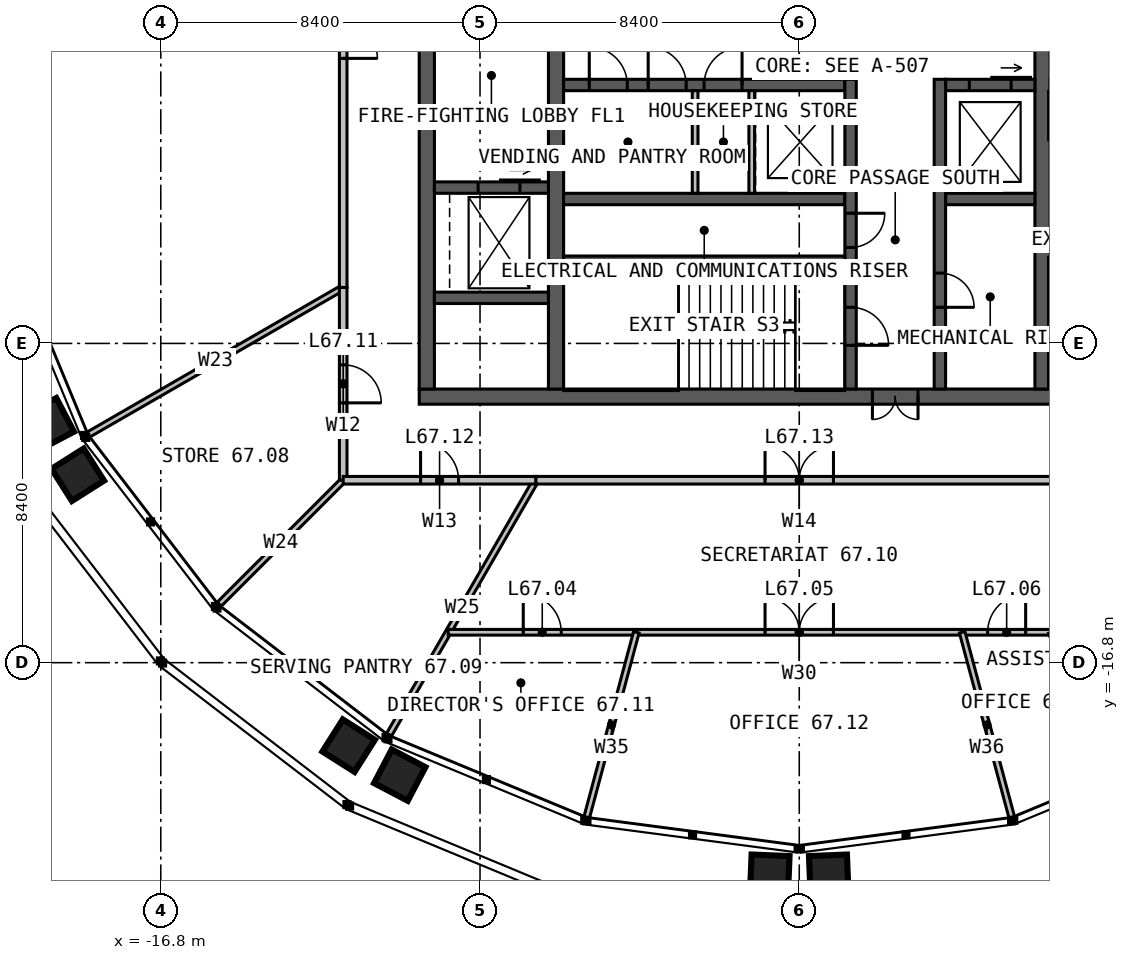
"""IFC4 building model, lengths in metres.
Left out: names, types, materials, properties, quantities, classifications, styles, units other than length and angle.
Written with IfcOpenShell. Run it as: python <this file> out.ifc"""

import sys

from ifc_helpers import new_model, si_unit, direction, frame, frame_2d, origin, place, context, subcontext, project, spatial, rectangle, extrude, element, fill, save


model = new_model("IFC4")
c1 = context("Model", 3, precision=1e-05, world=origin(), true_north=direction((0.0, 1.0)))
c2 = subcontext(c1, "Body", "Model", "MODEL_VIEW")
j1 = project(units=[si_unit("LENGTHUNIT", "METRE"), si_unit("PLANEANGLEUNIT", "RADIAN")], contexts=[c1])
p1 = place(None, origin())
s1 = spatial("IfcSite", under=j1, at=p1, CompositionType="ELEMENT")
p2 = place(p1, origin())
s2 = spatial("IfcBuilding", under=s1, at=p2, CompositionType="ELEMENT")
p3 = place(p2, frame((0.0, 0.0, 276.0)))
s3 = spatial("IfcBuildingStorey", under=s2, at=p3, CompositionType="ELEMENT", Elevation=276.0)
p4 = place(p3, frame((10.0, -9.8, 0.0), z_axis=(0.0, 0.0, 1.0), x_axis=(-1.0, 0.0, 0.0)))
e1 = element("IfcWall", 1, at=p4, inside=s3, PredefinedType="SOLIDWALL", context=c2, shape_type="SweptSolid", body=[
    extrude(rectangle(XDim=20.0, YDim=0.4, at=frame_2d((10.0, 0.0))), origin(), (0.0, 0.0, 1.0), 4.0),
])
p5 = place(p4, frame((6.875, 0.0, 0.0)))
e2 = element("IfcOpeningElement", 2, at=p5, cuts=e1, PredefinedType="OPENING", context=c2, shape_type="SweptSolid", body=[
    extrude(rectangle(XDim=1.2, YDim=2.2, at=frame_2d((0.6, 1.1))), frame((0.0, 0.21, 0.0), z_axis=(0.0, -1.0, 0.0), x_axis=(1.0, 0.0, 0.0)), (0.0, 0.0, 1.0), 0.42),
])
p6 = place(p3, frame((-9.8, 9.6, 0.0), z_axis=(0.0, 0.0, 1.0), x_axis=(0.0, -1.0, 0.0)))
e3 = element("IfcWall", 3, at=p6, inside=s3, PredefinedType="SOLIDWALL", context=c2, shape_type="SweptSolid", body=[
    extrude(rectangle(XDim=19.2, YDim=0.4, at=frame_2d((9.6, 0.0))), origin(), (0.0, 0.0, 1.0), 4.0),
])
p7 = place(p3, frame((-6.4, -9.6, 0.0), z_axis=(0.0, 0.0, 1.0), x_axis=(0.0, 1.0, 0.0)))
e4 = element("IfcWall", 4, at=p7, inside=s3, PredefinedType="SOLIDWALL", context=c2, shape_type="SweptSolid", body=[
    extrude(rectangle(XDim=19.2, YDim=0.4, at=frame_2d((9.6, 0.0))), origin(), (0.0, 0.0, 1.0), 4.0),
])
p8 = place(p7, frame((9.1, 0.0, 0.0)))
e5 = element("IfcOpeningElement", 5, at=p8, cuts=e4, PredefinedType="OPENING", context=c2, shape_type="SweptSolid", body=[
    extrude(rectangle(XDim=1.0, YDim=2.2, at=frame_2d((0.5, 1.1))), frame((0.0, 0.21, 0.0), z_axis=(0.0, -1.0, 0.0), x_axis=(1.0, 0.0, 0.0)), (0.0, 0.0, 1.0), 0.42),
])
p9 = place(p3, frame((6.4, 9.6, 0.0), z_axis=(0.0, 0.0, 1.0), x_axis=(0.0, -1.0, 0.0)))
e6 = element("IfcWall", 6, at=p9, inside=s3, PredefinedType="SOLIDWALL", context=c2, shape_type="SweptSolid", body=[
    extrude(rectangle(XDim=19.2, YDim=0.4, at=frame_2d((9.6, 0.0))), origin(), (0.0, 0.0, 1.0), 4.0),
])
p10 = place(p9, frame((9.1, 0.0, 0.0)))
e7 = element("IfcOpeningElement", 7, at=p10, cuts=e6, PredefinedType="OPENING", context=c2, shape_type="SweptSolid", body=[
    extrude(rectangle(XDim=1.0, YDim=2.2, at=frame_2d((0.5, 1.1))), frame((0.0, 0.21, 0.0), z_axis=(0.0, -1.0, 0.0), x_axis=(1.0, 0.0, 0.0)), (0.0, 0.0, 1.0), 0.42),
])
p11 = place(p3, frame((-6.2, -1.6, 0.0), z_axis=(0.0, 0.0, 1.0), x_axis=(1.0, 0.0, 0.0)))
e8 = element("IfcWall", 8, at=p11, inside=s3, PredefinedType="SOLIDWALL", context=c2, shape_type="SweptSolid", body=[
    extrude(rectangle(XDim=7.4, YDim=0.3, at=frame_2d((3.7, 0.0))), origin(), (0.0, 0.0, 1.0), 4.0),
])
p12 = place(p11, frame((0.675, 0.0, 0.0)))
e9 = element("IfcOpeningElement", 9, at=p12, cuts=e8, PredefinedType="OPENING", context=c2, shape_type="SweptSolid", body=[
    extrude(rectangle(XDim=1.0, YDim=2.2, at=frame_2d((0.5, 1.1))), frame((0.0, 0.16, 0.0), z_axis=(0.0, -1.0, 0.0), x_axis=(1.0, 0.0, 0.0)), (0.0, 0.0, 1.0), 0.32),
])
p13 = place(p11, frame((2.225, 0.0, 0.0)))
e10 = element("IfcOpeningElement", 10, at=p13, cuts=e8, PredefinedType="OPENING", context=c2, shape_type="SweptSolid", body=[
    extrude(rectangle(XDim=1.0, YDim=2.2, at=frame_2d((0.5, 1.1))), frame((0.0, 0.16, 0.0), z_axis=(0.0, -1.0, 0.0), x_axis=(1.0, 0.0, 0.0)), (0.0, 0.0, 1.0), 0.32),
])
p14 = place(p11, frame((3.695, 0.0, 0.0)))
e11 = element("IfcOpeningElement", 11, at=p14, cuts=e8, PredefinedType="OPENING", context=c2, shape_type="SweptSolid", body=[
    extrude(rectangle(XDim=1.0, YDim=2.2, at=frame_2d((0.5, 1.1))), frame((0.0, 0.16, 0.0), z_axis=(0.0, -1.0, 0.0), x_axis=(1.0, 0.0, 0.0)), (0.0, 0.0, 1.0), 0.32),
])
p15 = place(p3, frame((3.85, -1.6, 0.0), z_axis=(0.0, 0.0, 1.0), x_axis=(1.0, 0.0, 0.0)))
e12 = element("IfcWall", 12, at=p15, inside=s3, PredefinedType="SOLIDWALL", context=c2, shape_type="SweptSolid", body=[
    extrude(rectangle(XDim=2.35, YDim=0.3, at=frame_2d((1.175, 0.0))), origin(), (0.0, 0.0, 1.0), 4.0),
])
p16 = place(p15, frame((0.625, 0.0, 0.0)))
e13 = element("IfcOpeningElement", 13, at=p16, cuts=e12, PredefinedType="OPENING", context=c2, shape_type="SweptSolid", body=[
    extrude(rectangle(XDim=1.1, YDim=2.2, at=frame_2d((0.55, 1.1))), frame((0.0, 0.16, 0.0), z_axis=(0.0, -1.0, 0.0), x_axis=(1.0, 0.0, 0.0)), (0.0, 0.0, 1.0), 0.32),
])
p17 = place(p3, frame((-6.2, -4.6, 0.0), z_axis=(0.0, 0.0, 1.0), x_axis=(1.0, 0.0, 0.0)))
e14 = element("IfcWall", 14, at=p17, inside=s3, PredefinedType="SOLIDWALL", context=c2, shape_type="SweptSolid", body=[
    extrude(rectangle(XDim=7.4, YDim=0.3, at=frame_2d((3.7, 0.0))), origin(), (0.0, 0.0, 1.0), 4.0),
])
p18 = place(p3, frame((3.85, -4.6, 0.0), z_axis=(0.0, 0.0, 1.0), x_axis=(1.0, 0.0, 0.0)))
e15 = element("IfcWall", 15, at=p18, inside=s3, PredefinedType="SOLIDWALL", context=c2, shape_type="SweptSolid", body=[
    extrude(rectangle(XDim=2.35, YDim=0.3, at=frame_2d((1.175, 0.0))), origin(), (0.0, 0.0, 1.0), 4.0),
])
p19 = place(p3, frame((1.35, -1.45, 0.0), z_axis=(0.0, 0.0, 1.0), x_axis=(0.0, -1.0, 0.0)))
e16 = element("IfcWall", 16, at=p19, inside=s3, PredefinedType="SOLIDWALL", context=c2, shape_type="SweptSolid", body=[
    extrude(rectangle(XDim=8.15, YDim=0.3, at=frame_2d((4.075, 0.0))), origin(), (0.0, 0.0, 1.0), 4.0),
])
p20 = place(p19, frame((6.0, 0.0, 0.0)))
e17 = element("IfcOpeningElement", 17, at=p20, cuts=e16, PredefinedType="OPENING", context=c2, shape_type="SweptSolid", body=[
    extrude(rectangle(XDim=1.0, YDim=2.2, at=frame_2d((0.5, 1.1))), frame((0.0, 0.16, 0.0), z_axis=(0.0, -1.0, 0.0), x_axis=(1.0, 0.0, 0.0)), (0.0, 0.0, 1.0), 0.32),
])
p21 = place(p19, frame((3.525, 0.0, 0.0)))
e18 = element("IfcOpeningElement", 18, at=p21, cuts=e16, PredefinedType="OPENING", context=c2, shape_type="SweptSolid", body=[
    extrude(rectangle(XDim=0.9, YDim=2.2, at=frame_2d((0.45, 1.1))), frame((0.0, 0.16, 0.0), z_axis=(0.0, -1.0, 0.0), x_axis=(1.0, 0.0, 0.0)), (0.0, 0.0, 1.0), 0.32),
])
p22 = place(p3, frame((3.7, -1.45, 0.0), z_axis=(0.0, 0.0, 1.0), x_axis=(0.0, -1.0, 0.0)))
e19 = element("IfcWall", 19, at=p22, inside=s3, PredefinedType="SOLIDWALL", context=c2, shape_type="SweptSolid", body=[
    extrude(rectangle(XDim=8.15, YDim=0.3, at=frame_2d((4.075, 0.0))), origin(), (0.0, 0.0, 1.0), 4.0),
])
p23 = place(p22, frame((5.1, 0.0, 0.0)))
e20 = element("IfcOpeningElement", 20, at=p23, cuts=e19, PredefinedType="OPENING", context=c2, shape_type="SweptSolid", body=[
    extrude(rectangle(XDim=0.9, YDim=2.2, at=frame_2d((0.45, 1.1))), frame((0.0, 0.16, 0.0), z_axis=(0.0, -1.0, 0.0), x_axis=(1.0, 0.0, 0.0)), (0.0, 0.0, 1.0), 0.32),
])
p24 = place(p3, frame((-6.2, -6.2, 0.0), z_axis=(0.0, 0.0, 1.0), x_axis=(1.0, 0.0, 0.0)))
e21 = element("IfcWall", 21, at=p24, inside=s3, PredefinedType="SOLIDWALL", context=c2, shape_type="SweptSolid", body=[
    extrude(rectangle(XDim=7.4, YDim=0.2, at=frame_2d((3.7, 0.0))), origin(), (0.0, 0.0, 1.0), 4.0),
])
p25 = place(p3, frame((-9.6, -4.3, 0.0), z_axis=(0.0, 0.0, 1.0), x_axis=(1.0, 0.0, 0.0)))
e22 = element("IfcWall", 22, at=p25, inside=s3, PredefinedType="SOLIDWALL", context=c2, shape_type="SweptSolid", body=[
    extrude(rectangle(XDim=3.0, YDim=0.3, at=frame_2d((1.5, 0.0))), origin(), (0.0, 0.0, 1.0), 4.0),
])
p26 = place(p25, frame((1.15, 0.0, 0.0)))
e23 = element("IfcOpeningElement", 23, at=p26, cuts=e22, PredefinedType="OPENING", context=c2, shape_type="SweptSolid", body=[
    extrude(rectangle(XDim=1.1, YDim=2.2, at=frame_2d((0.55, 1.1))), frame((0.0, 0.16, 0.0), z_axis=(0.0, -1.0, 0.0), x_axis=(1.0, 0.0, 0.0)), (0.0, 0.0, 1.0), 0.32),
])
p27 = place(p3, frame((-9.6, -7.2, 0.0), z_axis=(0.0, 0.0, 1.0), x_axis=(1.0, 0.0, 0.0)))
e24 = element("IfcWall", 24, at=p27, inside=s3, PredefinedType="SOLIDWALL", context=c2, shape_type="SweptSolid", body=[
    extrude(rectangle(XDim=3.0, YDim=0.3, at=frame_2d((1.5, 0.0))), origin(), (0.0, 0.0, 1.0), 4.0),
])
for number, where, z_axis, x_axis in (
    (25, (-2.74, -1.75, 0.0), (0.0, 0.0, 1.0), (0.0, -1.0, 0.0)),
    (26, (-1.25, -1.75, 0.0), (0.0, 0.0, 1.0), (0.0, -1.0, 0.0)),
):
    element("IfcWall", number, at=place(p3, frame(where, z_axis=z_axis, x_axis=x_axis)), inside=s3, PredefinedType="PARTITIONING", context=c2, shape_type="SweptSolid", body=[
        extrude(rectangle(XDim=2.7, YDim=0.15, at=frame_2d((1.35, 0.0))), origin(), (0.0, 0.0, 1.0), 3.75),
    ])
p28 = place(p3, frame((-12.0, -6.928, 0.0), z_axis=(0.0, 0.0, 1.0), x_axis=(-0.866025099701, -0.500000526688, 0.0)))
e27 = element("IfcWall", 27, at=p28, inside=s3, PredefinedType="PARTITIONING", context=c2, shape_type="SweptSolid", body=[
    extrude(rectangle(XDim=7.752, YDim=0.15, at=frame_2d((3.876, 0.0))), origin(), (0.0, 0.0, 1.0), 2.79),
])
p29 = place(p3, frame((-12.0, -12.0, 0.0), z_axis=(0.0, 0.0, 1.0), x_axis=(-0.707106781187, -0.707106781187, 0.0)))
e28 = element("IfcWall", 28, at=p29, inside=s3, PredefinedType="PARTITIONING", context=c2, shape_type="SweptSolid", body=[
    extrude(rectangle(XDim=4.638, YDim=0.15, at=frame_2d((2.319, 0.0))), origin(), (0.0, 0.0, 1.0), 2.79),
])
p30 = place(p3, frame((-6.928, -12.0, 0.0), z_axis=(0.0, 0.0, 1.0), x_axis=(-0.500000526688, -0.866025099701, 0.0)))
e29 = element("IfcWall", 29, at=p30, inside=s3, PredefinedType="PARTITIONING", context=c2, shape_type="SweptSolid", body=[
    extrude(rectangle(XDim=7.752, YDim=0.15, at=frame_2d((3.876, 0.0))), origin(), (0.0, 0.0, 1.0), 2.79),
])
p31 = place(p3, frame((-12.0, 6.928, 0.0), z_axis=(0.0, 0.0, 1.0), x_axis=(0.0, -1.0, 0.0)))
e30 = element("IfcWall", 30, at=p31, inside=s3, PredefinedType="PARTITIONING", context=c2, shape_type="SweptSolid", body=[
    extrude(rectangle(XDim=13.856, YDim=0.2, at=frame_2d((6.928, 0.0))), origin(), (0.0, 0.0, 1.0), 3.8),
])
p32 = place(p31, frame((6.028, 0.0, 0.0)))
e31 = element("IfcOpeningElement", 31, at=p32, cuts=e30, PredefinedType="OPENING", context=c2, shape_type="SweptSolid", body=[
    extrude(rectangle(XDim=1.8, YDim=2.2, at=frame_2d((0.9, 1.1))), frame((0.0, 0.11, 0.0), z_axis=(0.0, -1.0, 0.0), x_axis=(1.0, 0.0, 0.0)), (0.0, 0.0, 1.0), 0.22),
])
p33 = place(p3, frame((-12.0, -6.928, 0.0), z_axis=(0.0, 0.0, 1.0), x_axis=(0.0, -1.0, 0.0)))
e32 = element("IfcWall", 32, at=p33, inside=s3, PredefinedType="PARTITIONING", context=c2, shape_type="SweptSolid", body=[
    extrude(rectangle(XDim=5.072, YDim=0.2, at=frame_2d((2.536, 0.0))), origin(), (0.0, 0.0, 1.0), 3.8),
])
p34 = place(p33, frame((2.036, 0.0, 0.0)))
e33 = element("IfcOpeningElement", 33, at=p34, cuts=e32, PredefinedType="OPENING", context=c2, shape_type="SweptSolid", body=[
    extrude(rectangle(XDim=1.0, YDim=2.2, at=frame_2d((0.5, 1.1))), frame((0.0, 0.11, 0.0), z_axis=(0.0, -1.0, 0.0), x_axis=(1.0, 0.0, 0.0)), (0.0, 0.0, 1.0), 0.22),
])
p35 = place(p3, frame((-12.0, -12.0, 0.0), z_axis=(0.0, 0.0, 1.0), x_axis=(1.0, 0.0, 0.0)))
e34 = element("IfcWall", 34, at=p35, inside=s3, PredefinedType="PARTITIONING", context=c2, shape_type="SweptSolid", body=[
    extrude(rectangle(XDim=5.072, YDim=0.2, at=frame_2d((2.536, 0.0))), origin(), (0.0, 0.0, 1.0), 3.8),
])
p36 = place(p35, frame((2.036, 0.0, 0.0)))
e35 = element("IfcOpeningElement", 35, at=p36, cuts=e34, PredefinedType="OPENING", context=c2, shape_type="SweptSolid", body=[
    extrude(rectangle(XDim=1.0, YDim=2.2, at=frame_2d((0.5, 1.1))), frame((0.0, 0.11, 0.0), z_axis=(0.0, -1.0, 0.0), x_axis=(1.0, 0.0, 0.0)), (0.0, 0.0, 1.0), 0.22),
])
p37 = place(p3, frame((-9.238, -16.0, 0.0), z_axis=(0.0, 0.0, 1.0), x_axis=(1.0, 0.0, 0.0)))
e36 = element("IfcWall", 36, at=p37, inside=s3, PredefinedType="PARTITIONING", context=c2, shape_type="SweptSolid", body=[
    extrude(rectangle(XDim=18.475, YDim=0.15, at=frame_2d((9.238, 0.0))), origin(), (0.0, 0.0, 1.0), 2.79),
])
p38 = place(p37, frame((1.975, 0.0, 0.0)))
e37 = element("IfcOpeningElement", 37, at=p38, cuts=e36, PredefinedType="OPENING", context=c2, shape_type="SweptSolid", body=[
    extrude(rectangle(XDim=1.0, YDim=2.2, at=frame_2d((0.5, 1.1))), frame((0.0, 0.085, 0.0), z_axis=(0.0, -1.0, 0.0), x_axis=(1.0, 0.0, 0.0)), (0.0, 0.0, 1.0), 0.17),
])
p39 = place(p37, frame((8.338, 0.0, 0.0)))
e38 = element("IfcOpeningElement", 38, at=p39, cuts=e36, PredefinedType="OPENING", context=c2, shape_type="SweptSolid", body=[
    extrude(rectangle(XDim=1.8, YDim=2.2, at=frame_2d((0.9, 1.1))), frame((0.0, 0.085, 0.0), z_axis=(0.0, -1.0, 0.0), x_axis=(1.0, 0.0, 0.0)), (0.0, 0.0, 1.0), 0.17),
])
p40 = place(p37, frame((14.195, 0.0, 0.0)))
e39 = element("IfcOpeningElement", 39, at=p40, cuts=e36, PredefinedType="OPENING", context=c2, shape_type="SweptSolid", body=[
    extrude(rectangle(XDim=1.0, YDim=2.2, at=frame_2d((0.5, 1.1))), frame((0.0, 0.085, 0.0), z_axis=(0.0, -1.0, 0.0), x_axis=(1.0, 0.0, 0.0)), (0.0, 0.0, 1.0), 0.17),
])
p41 = place(p37, frame((16.67, 0.0, 0.0)))
e40 = element("IfcOpeningElement", 40, at=p41, cuts=e36, PredefinedType="OPENING", context=c2, shape_type="SweptSolid", body=[
    extrude(rectangle(XDim=1.0, YDim=2.2, at=frame_2d((0.5, 1.1))), frame((0.0, 0.085, 0.0), z_axis=(0.0, -1.0, 0.0), x_axis=(1.0, 0.0, 0.0)), (0.0, 0.0, 1.0), 0.17),
])
for number, where, z_axis, x_axis in (
    (41, (-4.287, -16.0, 0.0), (0.0, 0.0, 1.0), (-0.259, -0.966, 0.0)),
    (42, (4.287, -16.0, 0.0), (0.0, 0.0, 1.0), (0.259, -0.966, 0.0)),
):
    element("IfcWall", number, at=place(p3, frame(where, z_axis=z_axis, x_axis=x_axis)), inside=s3, PredefinedType="PARTITIONING", context=c2, shape_type="SweptSolid", body=[
        extrude(rectangle(XDim=5.044, YDim=0.15, at=frame_2d((2.522, 0.0))), origin(), (0.0, 0.0, 1.0), 2.79),
    ])
p42 = place(p3, frame((6.627, -16.0, 0.0), z_axis=(0.0, 0.0, 1.0), x_axis=(0.382693194178, -0.923875488976, 0.0)))
e43 = element("IfcWall", 43, at=p42, inside=s3, PredefinedType="PARTITIONING", context=c2, shape_type="SweptSolid", body=[
    extrude(rectangle(XDim=4.105, YDim=0.15, at=frame_2d((2.053, 0.0))), origin(), (0.0, 0.0, 1.0), 2.79),
])
p43 = place(p3, frame((-6.928, -12.0, 0.0), z_axis=(0.0, 0.0, 1.0), x_axis=(1.0, 0.0, 0.0)))
e44 = element("IfcWall", 44, at=p43, inside=s3, PredefinedType="PARTITIONING", context=c2, shape_type="SweptSolid", body=[
    extrude(rectangle(XDim=13.856, YDim=0.2, at=frame_2d((6.928, 0.0))), origin(), (0.0, 0.0, 1.0), 3.8),
])
p44 = place(p43, frame((6.028, 0.0, 0.0)))
e45 = element("IfcOpeningElement", 45, at=p44, cuts=e44, PredefinedType="OPENING", context=c2, shape_type="SweptSolid", body=[
    extrude(rectangle(XDim=1.8, YDim=2.2, at=frame_2d((0.9, 1.1))), frame((0.0, 0.11, 0.0), z_axis=(0.0, -1.0, 0.0), x_axis=(1.0, 0.0, 0.0)), (0.0, 0.0, 1.0), 0.22),
])
p45 = place(p5, origin())
e46 = element("IfcDoor", 46, at=p45, inside=s3, OperationType="DOUBLE_DOOR_SINGLE_SWING", PredefinedType="DOOR", context=c2, shape_type="SweptSolid", body=[
    extrude(rectangle(XDim=1.2, YDim=2.2, at=frame_2d((0.6, 1.1))), frame((0.0, 0.025, 0.0), z_axis=(0.0, -1.0, 0.0), x_axis=(1.0, 0.0, 0.0)), (0.0, 0.0, 1.0), 0.05),
])
fill(e2, e46)
p46 = place(p20, origin())
e47 = element("IfcDoor", 47, at=p46, inside=s3, OperationType="SINGLE_SWING_RIGHT", PredefinedType="DOOR", context=c2, shape_type="SweptSolid", body=[
    extrude(rectangle(XDim=1.0, YDim=2.2, at=frame_2d((0.5, 1.1))), frame((0.0, 0.025, 0.0), z_axis=(0.0, -1.0, 0.0), x_axis=(1.0, 0.0, 0.0)), (0.0, 0.0, 1.0), 0.05),
])
fill(e17, e47)
p47 = place(p21, origin())
e48 = element("IfcDoor", 48, at=p47, inside=s3, OperationType="SINGLE_SWING_LEFT", PredefinedType="DOOR", context=c2, shape_type="SweptSolid", body=[
    extrude(rectangle(XDim=0.9, YDim=2.2, at=frame_2d((0.45, 1.1))), frame((0.0, 0.025, 0.0), z_axis=(0.0, -1.0, 0.0), x_axis=(1.0, 0.0, 0.0)), (0.0, 0.0, 1.0), 0.05),
])
fill(e18, e48)
p48 = place(p23, origin())
e49 = element("IfcDoor", 49, at=p48, inside=s3, OperationType="SINGLE_SWING_RIGHT", PredefinedType="DOOR", context=c2, shape_type="SweptSolid", body=[
    extrude(rectangle(XDim=0.9, YDim=2.2, at=frame_2d((0.45, 1.1))), frame((0.0, 0.025, 0.0), z_axis=(0.0, -1.0, 0.0), x_axis=(1.0, 0.0, 0.0)), (0.0, 0.0, 1.0), 0.05),
])
fill(e20, e49)
p49 = place(p12, origin())
e50 = element("IfcDoor", 50, at=p49, inside=s3, OperationType="SINGLE_SWING_LEFT", PredefinedType="DOOR", context=c2, shape_type="SweptSolid", body=[
    extrude(rectangle(XDim=1.0, YDim=2.2, at=frame_2d((0.5, 1.1))), frame((0.0, 0.025, 0.0), z_axis=(0.0, -1.0, 0.0), x_axis=(1.0, 0.0, 0.0)), (0.0, 0.0, 1.0), 0.05),
])
fill(e9, e50)
p50 = place(p13, origin())
e51 = element("IfcDoor", 51, at=p50, inside=s3, OperationType="SINGLE_SWING_LEFT", PredefinedType="DOOR", context=c2, shape_type="SweptSolid", body=[
    extrude(rectangle(XDim=1.0, YDim=2.2, at=frame_2d((0.5, 1.1))), frame((0.0, 0.025, 0.0), z_axis=(0.0, -1.0, 0.0), x_axis=(1.0, 0.0, 0.0)), (0.0, 0.0, 1.0), 0.05),
])
fill(e10, e51)
p51 = place(p14, origin())
e52 = element("IfcDoor", 52, at=p51, inside=s3, OperationType="SINGLE_SWING_RIGHT", PredefinedType="DOOR", context=c2, shape_type="SweptSolid", body=[
    extrude(rectangle(XDim=1.0, YDim=2.2, at=frame_2d((0.5, 1.1))), frame((0.0, 0.025, 0.0), z_axis=(0.0, -1.0, 0.0), x_axis=(1.0, 0.0, 0.0)), (0.0, 0.0, 1.0), 0.05),
])
fill(e11, e52)
p52 = place(p16, origin())
e53 = element("IfcDoor", 53, at=p52, inside=s3, OperationType="SLIDING_TO_LEFT", PredefinedType="DOOR", context=c2, shape_type="SweptSolid", body=[
    extrude(rectangle(XDim=1.1, YDim=2.2, at=frame_2d((0.55, 1.1))), frame((0.0, 0.025, 0.0), z_axis=(0.0, -1.0, 0.0), x_axis=(1.0, 0.0, 0.0)), (0.0, 0.0, 1.0), 0.05),
])
fill(e13, e53)
p53 = place(p26, origin())
e54 = element("IfcDoor", 54, at=p53, inside=s3, OperationType="SLIDING_TO_LEFT", PredefinedType="DOOR", context=c2, shape_type="SweptSolid", body=[
    extrude(rectangle(XDim=1.1, YDim=2.2, at=frame_2d((0.55, 1.1))), frame((0.0, 0.025, 0.0), z_axis=(0.0, -1.0, 0.0), x_axis=(1.0, 0.0, 0.0)), (0.0, 0.0, 1.0), 0.05),
])
fill(e23, e54)
p54 = place(p32, origin())
e55 = element("IfcDoor", 55, at=p54, inside=s3, OperationType="DOUBLE_DOOR_SINGLE_SWING", PredefinedType="DOOR", context=c2, shape_type="SweptSolid", body=[
    extrude(rectangle(XDim=1.8, YDim=2.2, at=frame_2d((0.9, 1.1))), frame((0.0, 0.025, 0.0), z_axis=(0.0, -1.0, 0.0), x_axis=(1.0, 0.0, 0.0)), (0.0, 0.0, 1.0), 0.05),
])
fill(e31, e55)
p55 = place(p34, origin())
e56 = element("IfcDoor", 56, at=p55, inside=s3, OperationType="SINGLE_SWING_RIGHT", PredefinedType="DOOR", context=c2, shape_type="SweptSolid", body=[
    extrude(rectangle(XDim=1.0, YDim=2.2, at=frame_2d((0.5, 1.1))), frame((0.0, 0.025, 0.0), z_axis=(0.0, -1.0, 0.0), x_axis=(1.0, 0.0, 0.0)), (0.0, 0.0, 1.0), 0.05),
])
fill(e33, e56)
p56 = place(p36, origin())
e57 = element("IfcDoor", 57, at=p56, inside=s3, OperationType="SINGLE_SWING_LEFT", PredefinedType="DOOR", context=c2, shape_type="SweptSolid", body=[
    extrude(rectangle(XDim=1.0, YDim=2.2, at=frame_2d((0.5, 1.1))), frame((0.0, 0.025, 0.0), z_axis=(0.0, -1.0, 0.0), x_axis=(1.0, 0.0, 0.0)), (0.0, 0.0, 1.0), 0.05),
])
fill(e35, e57)
p57 = place(p38, origin())
e58 = element("IfcDoor", 58, at=p57, inside=s3, OperationType="SINGLE_SWING_LEFT", PredefinedType="DOOR", context=c2, shape_type="SweptSolid", body=[
    extrude(rectangle(XDim=1.0, YDim=2.2, at=frame_2d((0.5, 1.1))), frame((0.0, 0.025, 0.0), z_axis=(0.0, -1.0, 0.0), x_axis=(1.0, 0.0, 0.0)), (0.0, 0.0, 1.0), 0.05),
])
fill(e37, e58)
p58 = place(p39, origin())
e59 = element("IfcDoor", 59, at=p58, inside=s3, OperationType="DOUBLE_DOOR_SINGLE_SWING", PredefinedType="DOOR", context=c2, shape_type="SweptSolid", body=[
    extrude(rectangle(XDim=1.8, YDim=2.2, at=frame_2d((0.9, 1.1))), frame((0.0, 0.025, 0.0), z_axis=(0.0, -1.0, 0.0), x_axis=(1.0, 0.0, 0.0)), (0.0, 0.0, 1.0), 0.05),
])
fill(e38, e59)
p59 = place(p40, origin())
e60 = element("IfcDoor", 60, at=p59, inside=s3, OperationType="SINGLE_SWING_RIGHT", PredefinedType="DOOR", context=c2, shape_type="SweptSolid", body=[
    extrude(rectangle(XDim=1.0, YDim=2.2, at=frame_2d((0.5, 1.1))), frame((0.0, 0.025, 0.0), z_axis=(0.0, -1.0, 0.0), x_axis=(1.0, 0.0, 0.0)), (0.0, 0.0, 1.0), 0.05),
])
fill(e39, e60)
p60 = place(p44, origin())
e61 = element("IfcDoor", 61, at=p60, inside=s3, OperationType="DOUBLE_DOOR_SINGLE_SWING", PredefinedType="DOOR", context=c2, shape_type="SweptSolid", body=[
    extrude(rectangle(XDim=1.8, YDim=2.2, at=frame_2d((0.9, 1.1))), frame((0.0, 0.025, 0.0), z_axis=(0.0, -1.0, 0.0), x_axis=(1.0, 0.0, 0.0)), (0.0, 0.0, 1.0), 0.05),
])
fill(e45, e61)
save(model, sys.argv[1])
